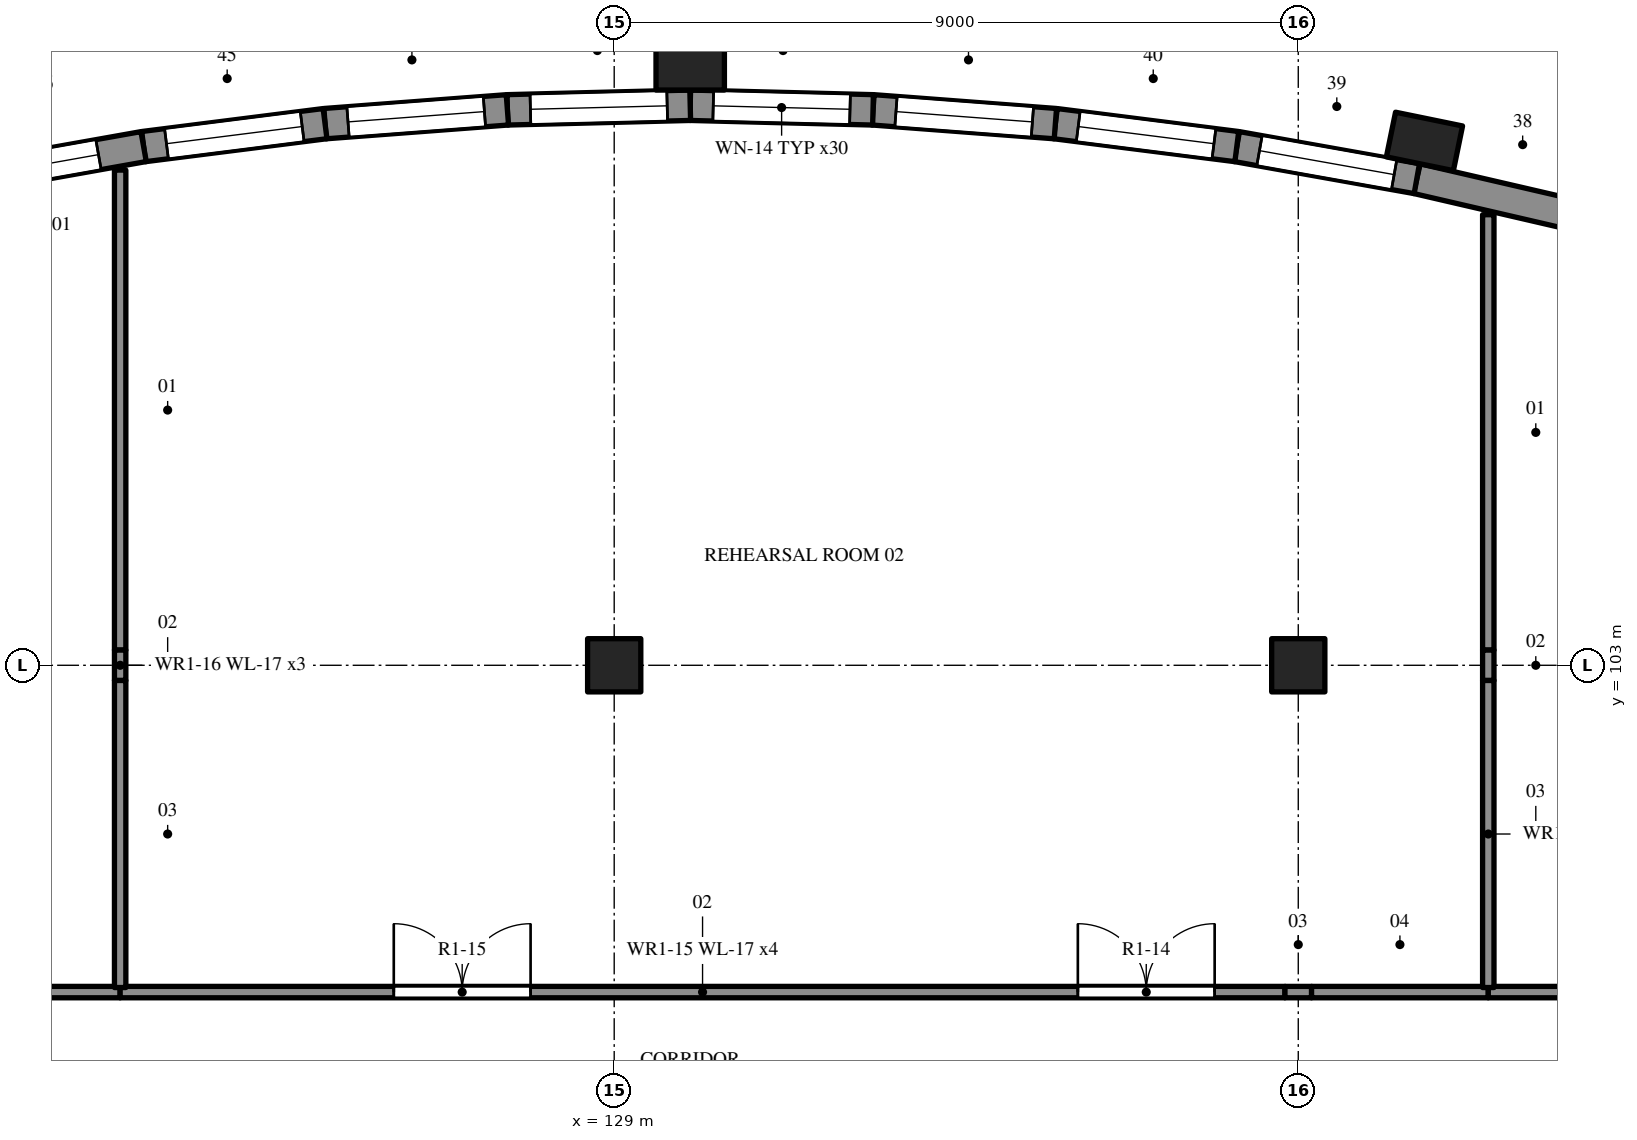
"""IFC4 building model, lengths in metres.
Left out: names, types, materials, properties, quantities, classifications, styles, units other than length and angle.
Written with IfcOpenShell. Run it as: python <this file> out.ifc"""

import sys

from ifc_helpers import new_model, si_unit, direction, frame, frame_2d, origin, origin_2d, place, context, subcontext, project, spatial, rectangle, extrude, element, fill, save


model = new_model("IFC4")
c1 = context("Model", 3, precision=1e-05, world=origin(), true_north=direction((0.0, 1.0)))
c2 = subcontext(c1, "Body", "Model", "MODEL_VIEW")
j1 = project(units=[si_unit("LENGTHUNIT", "METRE"), si_unit("PLANEANGLEUNIT", "RADIAN")], contexts=[c1])
p1 = place(None, origin())
s1 = spatial("IfcSite", under=j1, at=p1, CompositionType="ELEMENT")
p2 = place(p1, origin())
s2 = spatial("IfcBuilding", under=s1, at=p2, CompositionType="ELEMENT")
p3 = place(p2, frame((0.0, 0.0, 5.4)))
s3 = spatial("IfcBuildingStorey", under=s2, at=p3, CompositionType="ELEMENT", Elevation=5.4)
for number, where, z_axis, x_axis in (
    (1, (129.0, 103.0, 0.0), (0.0, 0.0, 1.0), (1.0, 0.0, 0.0)),
    (2, (138.0, 103.0, 0.0), (0.0, 0.0, 1.0), (1.0, 0.0, 0.0)),
):
    element("IfcColumn", number, at=place(p3, frame(where, z_axis=z_axis, x_axis=x_axis)), inside=s3, PredefinedType="COLUMN", context=c2, shape_type="SweptSolid", body=[
        extrude(rectangle(XDim=0.7, YDim=0.7, at=origin_2d()), origin(), (0.0, 0.0, 1.0), 4.52),
    ])
p4 = place(p3, frame((142.006, 108.836, 0.0), z_axis=(0.0, 0.0, 1.0), x_axis=(-0.974189274843, 0.225732710925, 0.0)))
e3 = element("IfcWall", 3, at=p4, inside=s3, PredefinedType="SOLIDWALL", context=c2, shape_type="SweptSolid", body=[
    extrude(rectangle(XDim=2.511, YDim=0.4, at=frame_2d((1.256, 0.0))), origin(), (0.0, 0.0, 1.0), 4.8),
])
p5 = place(p3, frame((139.56, 109.403, 0.0), z_axis=(0.0, 0.0, 1.0), x_axis=(-0.984524011381, 0.175249738987, 0.0)))
e4 = element("IfcWall", 4, at=p5, inside=s3, PredefinedType="SOLIDWALL", context=c2, shape_type="SweptSolid", body=[
    extrude(rectangle(XDim=2.406, YDim=0.4, at=frame_2d((1.203, 0.0))), origin(), (0.0, 0.0, 1.0), 4.8),
])
p6 = place(p5, frame((0.303, 0.0, 1.0)))
e5 = element("IfcOpeningElement", 5, at=p6, cuts=e4, PredefinedType="OPENING", context=c2, shape_type="SweptSolid", body=[
    extrude(rectangle(XDim=1.8, YDim=2.1, at=frame_2d((0.9, 1.05))), frame((0.0, 0.21, 0.0), z_axis=(0.0, -1.0, 0.0), x_axis=(1.0, 0.0, 0.0)), (0.0, 0.0, 1.0), 0.42),
])
p7 = place(p3, frame((137.191, 109.825, 0.0), z_axis=(0.0, 0.0, 1.0), x_axis=(-0.99208939311, 0.125533406227, 0.0)))
e6 = element("IfcWall", 6, at=p7, inside=s3, PredefinedType="SOLIDWALL", context=c2, shape_type="SweptSolid", body=[
    extrude(rectangle(XDim=2.406, YDim=0.4, at=frame_2d((1.203, 0.0))), origin(), (0.0, 0.0, 1.0), 4.8),
])
p8 = place(p7, frame((0.303, 0.0, 1.0)))
e7 = element("IfcOpeningElement", 7, at=p8, cuts=e6, PredefinedType="OPENING", context=c2, shape_type="SweptSolid", body=[
    extrude(rectangle(XDim=1.8, YDim=2.1, at=frame_2d((0.9, 1.05))), frame((0.0, 0.21, 0.0), z_axis=(0.0, -1.0, 0.0), x_axis=(1.0, 0.0, 0.0)), (0.0, 0.0, 1.0), 0.42),
])
p9 = place(p3, frame((134.804, 110.127, 0.0), z_axis=(0.0, 0.0, 1.0), x_axis=(-0.997153910364, 0.075392831525, 0.0)))
e8 = element("IfcWall", 8, at=p9, inside=s3, PredefinedType="SOLIDWALL", context=c2, shape_type="SweptSolid", body=[
    extrude(rectangle(XDim=2.406, YDim=0.4, at=frame_2d((1.203, 0.0))), origin(), (0.0, 0.0, 1.0), 4.8),
])
p10 = place(p9, frame((0.303, 0.0, 1.0)))
e9 = element("IfcOpeningElement", 9, at=p10, cuts=e8, PredefinedType="OPENING", context=c2, shape_type="SweptSolid", body=[
    extrude(rectangle(XDim=1.8, YDim=2.1, at=frame_2d((0.9, 1.05))), frame((0.0, 0.21, 0.0), z_axis=(0.0, -1.0, 0.0), x_axis=(1.0, 0.0, 0.0)), (0.0, 0.0, 1.0), 0.42),
])
p11 = place(p3, frame((132.405, 110.308, 0.0), z_axis=(0.0, 0.0, 1.0), x_axis=(-0.999683321759, 0.025164582196, 0.0)))
e10 = element("IfcWall", 10, at=p11, inside=s3, PredefinedType="SOLIDWALL", context=c2, shape_type="SweptSolid", body=[
    extrude(rectangle(XDim=2.406, YDim=0.4, at=frame_2d((1.203, 0.0))), origin(), (0.0, 0.0, 1.0), 4.8),
])
p12 = place(p11, frame((0.303, 0.0, 1.0)))
e11 = element("IfcOpeningElement", 11, at=p12, cuts=e10, PredefinedType="OPENING", context=c2, shape_type="SweptSolid", body=[
    extrude(rectangle(XDim=1.8, YDim=2.1, at=frame_2d((0.9, 1.05))), frame((0.0, 0.21, 0.0), z_axis=(0.0, -1.0, 0.0), x_axis=(1.0, 0.0, 0.0)), (0.0, 0.0, 1.0), 0.42),
])
p13 = place(p3, frame((130.0, 110.369, 0.0), z_axis=(0.0, 0.0, 1.0), x_axis=(-0.999683321759, -0.025164582196, 0.0)))
e12 = element("IfcWall", 12, at=p13, inside=s3, PredefinedType="SOLIDWALL", context=c2, shape_type="SweptSolid", body=[
    extrude(rectangle(XDim=2.406, YDim=0.4, at=frame_2d((1.203, 0.0))), origin(), (0.0, 0.0, 1.0), 4.8),
])
p14 = place(p13, frame((0.303, 0.0, 1.0)))
e13 = element("IfcOpeningElement", 13, at=p14, cuts=e12, PredefinedType="OPENING", context=c2, shape_type="SweptSolid", body=[
    extrude(rectangle(XDim=1.8, YDim=2.1, at=frame_2d((0.9, 1.05))), frame((0.0, 0.21, 0.0), z_axis=(0.0, -1.0, 0.0), x_axis=(1.0, 0.0, 0.0)), (0.0, 0.0, 1.0), 0.42),
])
p15 = place(p3, frame((127.595, 110.308, 0.0), z_axis=(0.0, 0.0, 1.0), x_axis=(-0.997153910364, -0.075392831525, 0.0)))
e14 = element("IfcWall", 14, at=p15, inside=s3, PredefinedType="SOLIDWALL", context=c2, shape_type="SweptSolid", body=[
    extrude(rectangle(XDim=2.406, YDim=0.4, at=frame_2d((1.203, 0.0))), origin(), (0.0, 0.0, 1.0), 4.8),
])
p16 = place(p15, frame((0.303, 0.0, 1.0)))
e15 = element("IfcOpeningElement", 15, at=p16, cuts=e14, PredefinedType="OPENING", context=c2, shape_type="SweptSolid", body=[
    extrude(rectangle(XDim=1.8, YDim=2.1, at=frame_2d((0.9, 1.05))), frame((0.0, 0.21, 0.0), z_axis=(0.0, -1.0, 0.0), x_axis=(1.0, 0.0, 0.0)), (0.0, 0.0, 1.0), 0.42),
])
p17 = place(p3, frame((125.196, 110.127, 0.0), z_axis=(0.0, 0.0, 1.0), x_axis=(-0.99208939311, -0.125533406227, 0.0)))
e16 = element("IfcWall", 16, at=p17, inside=s3, PredefinedType="SOLIDWALL", context=c2, shape_type="SweptSolid", body=[
    extrude(rectangle(XDim=2.406, YDim=0.4, at=frame_2d((1.203, 0.0))), origin(), (0.0, 0.0, 1.0), 4.8),
])
p18 = place(p17, frame((0.303, 0.0, 1.0)))
e17 = element("IfcOpeningElement", 17, at=p18, cuts=e16, PredefinedType="OPENING", context=c2, shape_type="SweptSolid", body=[
    extrude(rectangle(XDim=1.8, YDim=2.1, at=frame_2d((0.9, 1.05))), frame((0.0, 0.21, 0.0), z_axis=(0.0, -1.0, 0.0), x_axis=(1.0, 0.0, 0.0)), (0.0, 0.0, 1.0), 0.42),
])
p19 = place(p3, frame((122.809, 109.825, 0.0), z_axis=(0.0, 0.0, 1.0), x_axis=(-0.984524011381, -0.175249738987, 0.0)))
e18 = element("IfcWall", 18, at=p19, inside=s3, PredefinedType="SOLIDWALL", context=c2, shape_type="SweptSolid", body=[
    extrude(rectangle(XDim=2.406, YDim=0.4, at=frame_2d((1.203, 0.0))), origin(), (0.0, 0.0, 1.0), 4.8),
])
p20 = place(p19, frame((0.603, 0.0, 0.9)))
e19 = element("IfcOpeningElement", 19, at=p20, cuts=e18, PredefinedType="OPENING", context=c2, shape_type="SweptSolid", body=[
    extrude(rectangle(XDim=1.5, YDim=2.1, at=frame_2d((0.75, 1.05))), frame((0.0, 0.21, 0.0), z_axis=(0.0, -1.0, 0.0), x_axis=(1.0, 0.0, 0.0)), (0.0, 0.0, 1.0), 0.42),
])
for number, where, z_axis, x_axis in (
    (20, (130.0, 110.869, 0.0), (0.0, 0.0, 1.0), (-1.0, 0.0, 0.0)),
    (21, (139.66, 109.893, 0.0), (0.0, 0.0, 1.0), (-0.98, 0.201, 0.0)),
):
    element("IfcColumn", number, at=place(p3, frame(where, z_axis=z_axis, x_axis=x_axis)), inside=s3, PredefinedType="PILASTER", context=c2, shape_type="SweptSolid", body=[
        extrude(rectangle(XDim=0.9, YDim=0.6, at=origin_2d()), origin(), (0.0, 0.0, 1.0), 4.8),
    ])
p21 = place(p3, frame((117.33, 98.7, 0.0), z_axis=(0.0, 0.0, 1.0), x_axis=(1.0, 0.0, 0.0)))
e22 = element("IfcWall", 22, at=p21, inside=s3, PredefinedType="PARTITIONING", context=c2, shape_type="SweptSolid", body=[
    extrude(rectangle(XDim=5.17, YDim=0.15, at=frame_2d((2.585, 0.0))), origin(), (0.0, 0.0, 1.0), 4.52),
])
p22 = place(p21, frame((2.07, 0.0, 0.0)))
e23 = element("IfcOpeningElement", 23, at=p22, cuts=e22, PredefinedType="OPENING", context=c2, shape_type="SweptSolid", body=[
    extrude(rectangle(XDim=1.0, YDim=2.1, at=frame_2d((0.5, 1.05))), frame((0.0, 0.085, 0.0), z_axis=(0.0, -1.0, 0.0), x_axis=(1.0, 0.0, 0.0)), (0.0, 0.0, 1.0), 0.17),
])
p23 = place(p3, frame((122.5, 98.7, 0.0), z_axis=(0.0, 0.0, 1.0), x_axis=(1.0, 0.0, 0.0)))
e24 = element("IfcWall", 24, at=p23, inside=s3, PredefinedType="PARTITIONING", context=c2, shape_type="SweptSolid", body=[
    extrude(rectangle(XDim=15.325, YDim=0.15, at=frame_2d((7.663, 0.0))), origin(), (0.0, 0.0, 1.0), 4.52),
])
p24 = place(p23, frame((12.6, 0.0, 0.0)))
e25 = element("IfcOpeningElement", 25, at=p24, cuts=e24, PredefinedType="OPENING", context=c2, shape_type="SweptSolid", body=[
    extrude(rectangle(XDim=1.8, YDim=2.1, at=frame_2d((0.9, 1.05))), frame((0.0, 0.085, 0.0), z_axis=(0.0, -1.0, 0.0), x_axis=(1.0, 0.0, 0.0)), (0.0, 0.0, 1.0), 0.17),
])
p25 = place(p23, frame((3.6, 0.0, 0.0)))
e26 = element("IfcOpeningElement", 26, at=p25, cuts=e24, PredefinedType="OPENING", context=c2, shape_type="SweptSolid", body=[
    extrude(rectangle(XDim=1.8, YDim=2.1, at=frame_2d((0.9, 1.05))), frame((0.0, 0.085, 0.0), z_axis=(0.0, -1.0, 0.0), x_axis=(1.0, 0.0, 0.0)), (0.0, 0.0, 1.0), 0.17),
])
p26 = place(p3, frame((137.825, 98.7, 0.0), z_axis=(0.0, 0.0, 1.0), x_axis=(1.0, 0.0, 0.0)))
e27 = element("IfcWall", 27, at=p26, inside=s3, PredefinedType="PARTITIONING", context=c2, shape_type="SweptSolid", body=[
    extrude(rectangle(XDim=0.35, YDim=0.15, at=frame_2d((0.175, 0.0))), origin(), (0.0, 0.0, 1.0), 3.82),
])
p27 = place(p3, frame((138.175, 98.7, 0.0), z_axis=(0.0, 0.0, 1.0), x_axis=(1.0, 0.0, 0.0)))
e28 = element("IfcWall", 28, at=p27, inside=s3, PredefinedType="PARTITIONING", context=c2, shape_type="SweptSolid", body=[
    extrude(rectangle(XDim=2.325, YDim=0.15, at=frame_2d((1.163, 0.0))), origin(), (0.0, 0.0, 1.0), 4.52),
])
p28 = place(p3, frame((122.5, 109.516, 0.0), z_axis=(0.0, 0.0, 1.0), x_axis=(0.0, -1.0, 0.0)))
e29 = element("IfcWall", 29, at=p28, inside=s3, PredefinedType="PARTITIONING", context=c2, shape_type="SweptSolid", body=[
    extrude(rectangle(XDim=6.316, YDim=0.15, at=frame_2d((3.158, 0.0))), origin(), (0.0, 0.0, 1.0), 4.52),
])
p29 = place(p3, frame((122.5, 103.2, 0.0), z_axis=(0.0, 0.0, 1.0), x_axis=(0.0, -1.0, 0.0)))
e30 = element("IfcWall", 30, at=p29, inside=s3, PredefinedType="PARTITIONING", context=c2, shape_type="SweptSolid", body=[
    extrude(rectangle(XDim=0.4, YDim=0.15, at=frame_2d((0.2, 0.0))), origin(), (0.0, 0.0, 1.0), 3.72),
])
p30 = place(p3, frame((122.5, 102.8, 0.0), z_axis=(0.0, 0.0, 1.0), x_axis=(0.0, -1.0, 0.0)))
e31 = element("IfcWall", 31, at=p30, inside=s3, PredefinedType="PARTITIONING", context=c2, shape_type="SweptSolid", body=[
    extrude(rectangle(XDim=4.04, YDim=0.15, at=frame_2d((2.02, 0.0))), origin(), (0.0, 0.0, 1.0), 4.52),
])
p31 = place(p3, frame((140.5, 98.7, 0.0), z_axis=(0.0, 0.0, 1.0), x_axis=(1.0, 0.0, 0.0)))
e32 = element("IfcWall", 32, at=p31, inside=s3, PredefinedType="PARTITIONING", context=c2, shape_type="SweptSolid", body=[
    extrude(rectangle(XDim=6.325, YDim=0.15, at=frame_2d((3.163, 0.0))), origin(), (0.0, 0.0, 1.0), 4.52),
])
p32 = place(p31, frame((4.3, 0.0, 0.0)))
e33 = element("IfcOpeningElement", 33, at=p32, cuts=e32, PredefinedType="OPENING", context=c2, shape_type="SweptSolid", body=[
    extrude(rectangle(XDim=1.0, YDim=2.1, at=frame_2d((0.5, 1.05))), frame((0.0, 0.085, 0.0), z_axis=(0.0, -1.0, 0.0), x_axis=(1.0, 0.0, 0.0)), (0.0, 0.0, 1.0), 0.17),
])
p33 = place(p3, frame((140.5, 108.928, 0.0), z_axis=(0.0, 0.0, 1.0), x_axis=(0.0, -1.0, 0.0)))
e34 = element("IfcWall", 34, at=p33, inside=s3, PredefinedType="PARTITIONING", context=c2, shape_type="SweptSolid", body=[
    extrude(rectangle(XDim=5.729, YDim=0.15, at=frame_2d((2.864, 0.0))), origin(), (0.0, 0.0, 1.0), 4.52),
])
p34 = place(p3, frame((140.5, 103.2, 0.0), z_axis=(0.0, 0.0, 1.0), x_axis=(0.0, -1.0, 0.0)))
e35 = element("IfcWall", 35, at=p34, inside=s3, PredefinedType="PARTITIONING", context=c2, shape_type="SweptSolid", body=[
    extrude(rectangle(XDim=0.4, YDim=0.15, at=frame_2d((0.2, 0.0))), origin(), (0.0, 0.0, 1.0), 3.72),
])
p35 = place(p3, frame((140.5, 102.8, 0.0), z_axis=(0.0, 0.0, 1.0), x_axis=(0.0, -1.0, 0.0)))
e36 = element("IfcWall", 36, at=p35, inside=s3, PredefinedType="PARTITIONING", context=c2, shape_type="SweptSolid", body=[
    extrude(rectangle(XDim=4.04, YDim=0.15, at=frame_2d((2.02, 0.0))), origin(), (0.0, 0.0, 1.0), 4.52),
])
p36 = place(p6, origin())
e37 = element("IfcWindow", 37, at=p36, inside=s3, PartitioningType="SINGLE_PANEL", PredefinedType="WINDOW", context=c2, shape_type="SweptSolid", body=[
    extrude(rectangle(XDim=1.8, YDim=2.1, at=frame_2d((0.9, 1.05))), frame((0.0, 0.03, 0.0), z_axis=(0.0, -1.0, 0.0), x_axis=(1.0, 0.0, 0.0)), (0.0, 0.0, 1.0), 0.06),
])
fill(e5, e37)
p37 = place(p8, origin())
e38 = element("IfcWindow", 38, at=p37, inside=s3, PartitioningType="SINGLE_PANEL", PredefinedType="WINDOW", context=c2, shape_type="SweptSolid", body=[
    extrude(rectangle(XDim=1.8, YDim=2.1, at=frame_2d((0.9, 1.05))), frame((0.0, 0.03, 0.0), z_axis=(0.0, -1.0, 0.0), x_axis=(1.0, 0.0, 0.0)), (0.0, 0.0, 1.0), 0.06),
])
fill(e7, e38)
p38 = place(p10, origin())
e39 = element("IfcWindow", 39, at=p38, inside=s3, PartitioningType="SINGLE_PANEL", PredefinedType="WINDOW", context=c2, shape_type="SweptSolid", body=[
    extrude(rectangle(XDim=1.8, YDim=2.1, at=frame_2d((0.9, 1.05))), frame((0.0, 0.03, 0.0), z_axis=(0.0, -1.0, 0.0), x_axis=(1.0, 0.0, 0.0)), (0.0, 0.0, 1.0), 0.06),
])
fill(e9, e39)
p39 = place(p12, origin())
e40 = element("IfcWindow", 40, at=p39, inside=s3, PartitioningType="SINGLE_PANEL", PredefinedType="WINDOW", context=c2, shape_type="SweptSolid", body=[
    extrude(rectangle(XDim=1.8, YDim=2.1, at=frame_2d((0.9, 1.05))), frame((0.0, 0.03, 0.0), z_axis=(0.0, -1.0, 0.0), x_axis=(1.0, 0.0, 0.0)), (0.0, 0.0, 1.0), 0.06),
])
fill(e11, e40)
p40 = place(p14, origin())
e41 = element("IfcWindow", 41, at=p40, inside=s3, PartitioningType="SINGLE_PANEL", PredefinedType="WINDOW", context=c2, shape_type="SweptSolid", body=[
    extrude(rectangle(XDim=1.8, YDim=2.1, at=frame_2d((0.9, 1.05))), frame((0.0, 0.03, 0.0), z_axis=(0.0, -1.0, 0.0), x_axis=(1.0, 0.0, 0.0)), (0.0, 0.0, 1.0), 0.06),
])
fill(e13, e41)
p41 = place(p16, origin())
e42 = element("IfcWindow", 42, at=p41, inside=s3, PartitioningType="SINGLE_PANEL", PredefinedType="WINDOW", context=c2, shape_type="SweptSolid", body=[
    extrude(rectangle(XDim=1.8, YDim=2.1, at=frame_2d((0.9, 1.05))), frame((0.0, 0.03, 0.0), z_axis=(0.0, -1.0, 0.0), x_axis=(1.0, 0.0, 0.0)), (0.0, 0.0, 1.0), 0.06),
])
fill(e15, e42)
p42 = place(p18, origin())
e43 = element("IfcWindow", 43, at=p42, inside=s3, PartitioningType="SINGLE_PANEL", PredefinedType="WINDOW", context=c2, shape_type="SweptSolid", body=[
    extrude(rectangle(XDim=1.8, YDim=2.1, at=frame_2d((0.9, 1.05))), frame((0.0, 0.03, 0.0), z_axis=(0.0, -1.0, 0.0), x_axis=(1.0, 0.0, 0.0)), (0.0, 0.0, 1.0), 0.06),
])
fill(e17, e43)
p43 = place(p20, origin())
e44 = element("IfcWindow", 44, at=p43, inside=s3, PartitioningType="SINGLE_PANEL", PredefinedType="WINDOW", context=c2, shape_type="SweptSolid", body=[
    extrude(rectangle(XDim=1.5, YDim=2.1, at=frame_2d((0.75, 1.05))), frame((0.0, 0.03, 0.0), z_axis=(0.0, -1.0, 0.0), x_axis=(1.0, 0.0, 0.0)), (0.0, 0.0, 1.0), 0.06),
])
fill(e19, e44)
p44 = place(p24, origin())
e45 = element("IfcDoor", 45, at=p44, inside=s3, OperationType="DOUBLE_DOOR_SINGLE_SWING", PredefinedType="DOOR", context=c2, shape_type="SweptSolid", body=[
    extrude(rectangle(XDim=1.8, YDim=2.1, at=frame_2d((0.9, 1.05))), frame((0.0, 0.025, 0.0), z_axis=(0.0, -1.0, 0.0), x_axis=(1.0, 0.0, 0.0)), (0.0, 0.0, 1.0), 0.05),
])
fill(e25, e45)
p45 = place(p25, origin())
e46 = element("IfcDoor", 46, at=p45, inside=s3, OperationType="DOUBLE_DOOR_SINGLE_SWING", PredefinedType="DOOR", context=c2, shape_type="SweptSolid", body=[
    extrude(rectangle(XDim=1.8, YDim=2.1, at=frame_2d((0.9, 1.05))), frame((0.0, 0.025, 0.0), z_axis=(0.0, -1.0, 0.0), x_axis=(1.0, 0.0, 0.0)), (0.0, 0.0, 1.0), 0.05),
])
fill(e26, e46)
save(model, sys.argv[1])
